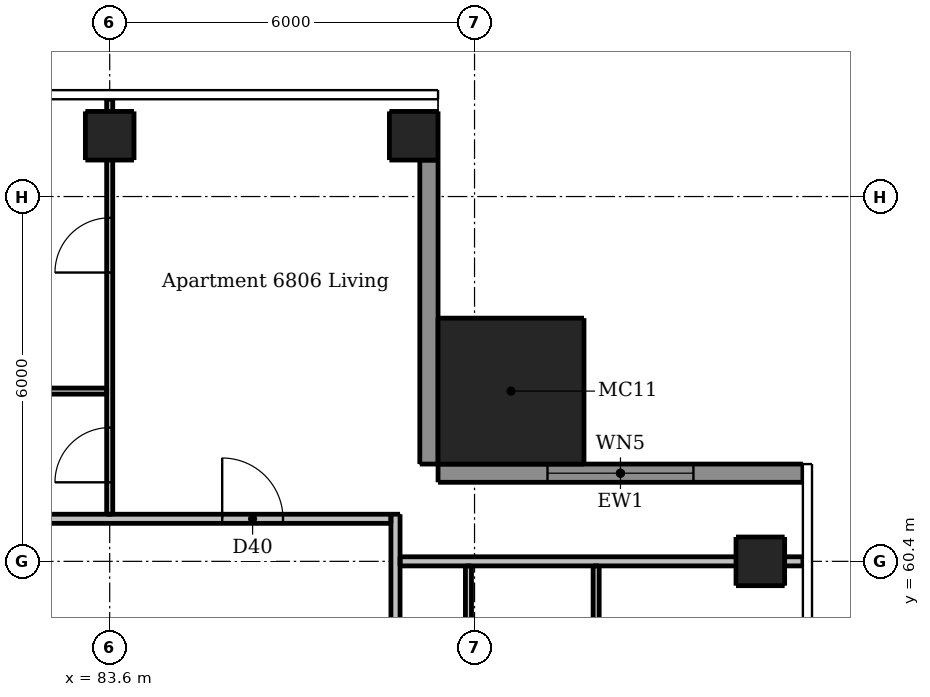
"""IFC4 building model, lengths in metres.
Left out: names, types, materials, properties, quantities, classifications, styles, units other than length and angle.
Written with IfcOpenShell. Run it as: python <this file> out.ifc"""

import sys

from ifc_helpers import new_model, si_unit, direction, frame, frame_2d, origin, origin_2d, place, context, subcontext, project, spatial, rectangle, extrude, element, fill, save


model = new_model("IFC4")
c1 = context("Model", 3, precision=1e-05, world=origin(), true_north=direction((0.0, 1.0)))
c2 = subcontext(c1, "Body", "Model", "MODEL_VIEW")
j1 = project(units=[si_unit("LENGTHUNIT", "METRE"), si_unit("PLANEANGLEUNIT", "RADIAN")], contexts=[c1])
p1 = place(None, origin())
s1 = spatial("IfcSite", under=j1, at=p1, CompositionType="ELEMENT")
p2 = place(p1, origin())
s2 = spatial("IfcBuilding", under=s1, at=p2, CompositionType="ELEMENT")
p3 = place(p2, frame((0.0, 0.0, 255.4)))
s3 = spatial("IfcBuildingStorey", under=s2, at=p3, CompositionType="ELEMENT", Elevation=255.4)
for number, where, z_axis, x_axis in (
    (1, (94.3, 60.4, 0.0), (0.0, 0.0, 1.0), (1.0, 0.0, 0.0)),
    (2, (83.6, 67.4, 0.0), (0.0, 0.0, 1.0), (1.0, 0.0, 0.0)),
    (3, (88.6, 67.4, 0.0), (0.0, 0.0, 1.0), (1.0, 0.0, 0.0)),
):
    element("IfcColumn", number, at=place(p3, frame(where, z_axis=z_axis, x_axis=x_axis)), inside=s3, PredefinedType="COLUMN", context=c2, shape_type="SweptSolid", body=[
        extrude(rectangle(XDim=0.8, YDim=0.8, at=origin_2d()), origin(), (0.0, 0.0, 1.0), 3.05),
    ])
p4 = place(p3, frame((90.2, 63.2, 0.0), z_axis=(0.0, 0.0, 1.0), x_axis=(1.0, 0.0, 0.0)))
e4 = element("IfcColumn", 4, at=p4, inside=s3, PredefinedType="COLUMN", context=c2, shape_type="SweptSolid", body=[
    extrude(rectangle(XDim=2.4, YDim=2.4, at=origin_2d()), origin(), (0.0, 0.0, 1.0), 3.3),
])
p5 = place(p3, frame((95.0, 61.85, 0.0), z_axis=(0.0, 0.0, 1.0), x_axis=(-1.0, 0.0, 0.0)))
e5 = element("IfcWall", 5, at=p5, inside=s3, PredefinedType="SOLIDWALL", context=c2, shape_type="SweptSolid", body=[
    extrude(rectangle(XDim=6.0, YDim=0.3, at=frame_2d((3.0, 0.0))), origin(), (0.0, 0.0, 1.0), 3.05),
])
p6 = place(p5, frame((1.8, 0.0, 0.15)))
e6 = element("IfcOpeningElement", 6, at=p6, cuts=e5, PredefinedType="OPENING", context=c2, shape_type="SweptSolid", body=[
    extrude(rectangle(XDim=2.4, YDim=2.1, at=frame_2d((1.2, 1.05))), frame((0.0, 0.16, 0.0), z_axis=(0.0, -1.0, 0.0), x_axis=(1.0, 0.0, 0.0)), (0.0, 0.0, 1.0), 0.32),
])
p7 = place(p3, frame((88.85, 62.0, 0.0), z_axis=(0.0, 0.0, 1.0), x_axis=(0.0, 1.0, 0.0)))
e7 = element("IfcWall", 7, at=p7, inside=s3, PredefinedType="SOLIDWALL", context=c2, shape_type="SweptSolid", body=[
    extrude(rectangle(XDim=5.0, YDim=0.3, at=frame_2d((2.5, 0.0))), origin(), (0.0, 0.0, 1.0), 3.05),
])
p8 = place(p3, frame((83.6, 61.175, 0.0), z_axis=(0.0, 0.0, 1.0), x_axis=(0.0, 1.0, 0.0)))
e8 = element("IfcWall", 8, at=p8, inside=s3, PredefinedType="PARTITIONING", context=c2, shape_type="SweptSolid", body=[
    extrude(rectangle(XDim=6.825, YDim=0.1, at=frame_2d((3.413, 0.0))), origin(), (0.0, 0.0, 1.0), 2.516),
])
p9 = place(p8, frame((0.525, 0.0, 0.0)))
e9 = element("IfcOpeningElement", 9, at=p9, cuts=e8, PredefinedType="OPENING", context=c2, shape_type="SweptSolid", body=[
    extrude(rectangle(XDim=0.9, YDim=2.1, at=frame_2d((0.45, 1.05))), frame((0.0, 0.06, 0.0), z_axis=(0.0, -1.0, 0.0), x_axis=(1.0, 0.0, 0.0)), (0.0, 0.0, 1.0), 0.12),
])
p10 = place(p8, frame((3.975, 0.0, 0.0)))
e10 = element("IfcOpeningElement", 10, at=p10, cuts=e8, PredefinedType="OPENING", context=c2, shape_type="SweptSolid", body=[
    extrude(rectangle(XDim=0.9, YDim=2.1, at=frame_2d((0.45, 1.05))), frame((0.0, 0.06, 0.0), z_axis=(0.0, -1.0, 0.0), x_axis=(1.0, 0.0, 0.0)), (0.0, 0.0, 1.0), 0.12),
])
p11 = place(p3, frame((89.5, 60.325, 0.0), z_axis=(0.0, 0.0, 1.0), x_axis=(0.0, -1.0, 0.0)))
e11 = element("IfcWall", 11, at=p11, inside=s3, PredefinedType="PARTITIONING", context=c2, shape_type="SweptSolid", body=[
    extrude(rectangle(XDim=17.85, YDim=0.1, at=frame_2d((8.925, 0.0))), origin(), (0.0, 0.0, 1.0), 3.05),
])
p12 = place(p11, frame((6.975, 0.0, 0.0)))
e12 = element("IfcOpeningElement", 12, at=p12, cuts=e11, PredefinedType="OPENING", context=c2, shape_type="SweptSolid", body=[
    extrude(rectangle(XDim=0.9, YDim=2.1, at=frame_2d((0.45, 1.05))), frame((0.0, 0.06, 0.0), z_axis=(0.0, -1.0, 0.0), x_axis=(1.0, 0.0, 0.0)), (0.0, 0.0, 1.0), 0.12),
])
p13 = place(p11, frame((0.975, 0.0, 0.0)))
e13 = element("IfcOpeningElement", 13, at=p13, cuts=e11, PredefinedType="OPENING", context=c2, shape_type="SweptSolid", body=[
    extrude(rectangle(XDim=0.9, YDim=2.1, at=frame_2d((0.45, 1.05))), frame((0.0, 0.06, 0.0), z_axis=(0.0, -1.0, 0.0), x_axis=(1.0, 0.0, 0.0)), (0.0, 0.0, 1.0), 0.12),
])
p14 = place(p11, frame((15.675, 0.0, 0.0)))
e14 = element("IfcOpeningElement", 14, at=p14, cuts=e11, PredefinedType="OPENING", context=c2, shape_type="SweptSolid", body=[
    extrude(rectangle(XDim=0.9, YDim=2.1, at=frame_2d((0.45, 1.05))), frame((0.0, 0.06, 0.0), z_axis=(0.0, -1.0, 0.0), x_axis=(1.0, 0.0, 0.0)), (0.0, 0.0, 1.0), 0.12),
])
p15 = place(p11, frame((12.725, 0.0, 0.0)))
e15 = element("IfcOpeningElement", 15, at=p15, cuts=e11, PredefinedType="OPENING", context=c2, shape_type="SweptSolid", body=[
    extrude(rectangle(XDim=0.8, YDim=2.1, at=frame_2d((0.4, 1.05))), frame((0.0, 0.06, 0.0), z_axis=(0.0, -1.0, 0.0), x_axis=(1.0, 0.0, 0.0)), (0.0, 0.0, 1.0), 0.12),
])
p16 = place(p3, frame((91.6, 57.35, 0.0), z_axis=(0.0, 0.0, 1.0), x_axis=(0.0, 1.0, 0.0)))
e16 = element("IfcWall", 16, at=p16, inside=s3, PredefinedType="PARTITIONING", context=c2, shape_type="SweptSolid", body=[
    extrude(rectangle(XDim=2.975, YDim=0.1, at=frame_2d((1.487, 0.0))), origin(), (0.0, 0.0, 1.0), 3.05),
])
p17 = place(p3, frame((83.55, 63.2, 0.0), z_axis=(0.0, 0.0, 1.0), x_axis=(-1.0, 0.0, 0.0)))
e17 = element("IfcWall", 17, at=p17, inside=s3, PredefinedType="PARTITIONING", context=c2, shape_type="SweptSolid", body=[
    extrude(rectangle(XDim=5.875, YDim=0.1, at=frame_2d((2.938, 0.0))), origin(), (0.0, 0.0, 1.0), 3.05),
])
p18 = place(p17, frame((3.75, 0.0, 0.0)))
e18 = element("IfcOpeningElement", 18, at=p18, cuts=e17, PredefinedType="OPENING", context=c2, shape_type="SweptSolid", body=[
    extrude(rectangle(XDim=0.8, YDim=2.1, at=frame_2d((0.4, 1.05))), frame((0.0, 0.06, 0.0), z_axis=(0.0, -1.0, 0.0), x_axis=(1.0, 0.0, 0.0)), (0.0, 0.0, 1.0), 0.12),
])
p19 = place(p3, frame((88.3, 61.175, 0.0), z_axis=(0.0, 0.0, 1.0), x_axis=(0.0, -1.0, 0.0)))
e19 = element("IfcWall", 19, at=p19, inside=s3, PredefinedType="PARTITIONING", context=c2, shape_type="SweptSolid", body=[
    extrude(rectangle(XDim=29.4, YDim=0.15, at=frame_2d((14.7, 0.0))), origin(), (0.0, 0.0, 1.0), 3.05),
])
p20 = place(p19, frame((27.025, 0.0, 0.0)))
e20 = element("IfcOpeningElement", 20, at=p20, cuts=e19, PredefinedType="OPENING", context=c2, shape_type="SweptSolid", body=[
    extrude(rectangle(XDim=1.0, YDim=2.1, at=frame_2d((0.5, 1.05))), frame((0.0, 0.085, 0.0), z_axis=(0.0, -1.0, 0.0), x_axis=(1.0, 0.0, 0.0)), (0.0, 0.0, 1.0), 0.17),
])
p21 = place(p19, frame((9.275, 0.0, 0.0)))
e21 = element("IfcOpeningElement", 21, at=p21, cuts=e19, PredefinedType="OPENING", context=c2, shape_type="SweptSolid", body=[
    extrude(rectangle(XDim=1.0, YDim=2.1, at=frame_2d((0.5, 1.05))), frame((0.0, 0.085, 0.0), z_axis=(0.0, -1.0, 0.0), x_axis=(1.0, 0.0, 0.0)), (0.0, 0.0, 1.0), 0.17),
])
p22 = place(p3, frame((58.975, 61.1, 0.0), z_axis=(0.0, 0.0, 1.0), x_axis=(1.0, 0.0, 0.0)))
e22 = element("IfcWall", 22, at=p22, inside=s3, PredefinedType="PARTITIONING", context=c2, shape_type="SweptSolid", body=[
    extrude(rectangle(XDim=29.25, YDim=0.15, at=frame_2d((14.625, 0.0))), origin(), (0.0, 0.0, 1.0), 3.05),
])
p23 = place(p22, frame((9.125, 0.0, 0.0)))
e23 = element("IfcOpeningElement", 23, at=p23, cuts=e22, PredefinedType="OPENING", context=c2, shape_type="SweptSolid", body=[
    extrude(rectangle(XDim=1.0, YDim=2.1, at=frame_2d((0.5, 1.05))), frame((0.0, 0.085, 0.0), z_axis=(0.0, -1.0, 0.0), x_axis=(1.0, 0.0, 0.0)), (0.0, 0.0, 1.0), 0.17),
])
p24 = place(p22, frame((26.475, 0.0, 0.0)))
e24 = element("IfcOpeningElement", 24, at=p24, cuts=e22, PredefinedType="OPENING", context=c2, shape_type="SweptSolid", body=[
    extrude(rectangle(XDim=1.0, YDim=2.1, at=frame_2d((0.5, 1.05))), frame((0.0, 0.085, 0.0), z_axis=(0.0, -1.0, 0.0), x_axis=(1.0, 0.0, 0.0)), (0.0, 0.0, 1.0), 0.17),
])
p25 = place(p3, frame((88.375, 60.4, 0.0), z_axis=(0.0, 0.0, 1.0), x_axis=(1.0, 0.0, 0.0)))
e25 = element("IfcWall", 25, at=p25, inside=s3, PredefinedType="PARTITIONING", context=c2, shape_type="SweptSolid", body=[
    extrude(rectangle(XDim=6.625, YDim=0.15, at=frame_2d((3.312, 0.0))), origin(), (0.0, 0.0, 1.0), 2.647),
])
p26 = place(p6, origin())
e26 = element("IfcWindow", 26, at=p26, inside=s3, PartitioningType="DOUBLE_PANEL_VERTICAL", PredefinedType="WINDOW", context=c2, shape_type="SweptSolid", body=[
    extrude(rectangle(XDim=2.4, YDim=2.1, at=frame_2d((1.2, 1.05))), frame((0.0, 0.03, 0.0), z_axis=(0.0, -1.0, 0.0), x_axis=(1.0, 0.0, 0.0)), (0.0, 0.0, 1.0), 0.06),
])
fill(e6, e26)
p27 = place(p24, origin())
e27 = element("IfcDoor", 27, at=p27, inside=s3, OperationType="SINGLE_SWING_LEFT", PredefinedType="DOOR", context=c2, shape_type="SweptSolid", body=[
    extrude(rectangle(XDim=1.0, YDim=2.1, at=frame_2d((0.5, 1.05))), frame((0.0, 0.025, 0.0), z_axis=(0.0, -1.0, 0.0), x_axis=(1.0, 0.0, 0.0)), (0.0, 0.0, 1.0), 0.05),
])
fill(e24, e27)
p28 = place(p9, origin())
e28 = element("IfcDoor", 28, at=p28, inside=s3, OperationType="SINGLE_SWING_LEFT", PredefinedType="DOOR", context=c2, shape_type="SweptSolid", body=[
    extrude(rectangle(XDim=0.9, YDim=2.1, at=frame_2d((0.45, 1.05))), frame((0.0, 0.025, 0.0), z_axis=(0.0, -1.0, 0.0), x_axis=(1.0, 0.0, 0.0)), (0.0, 0.0, 1.0), 0.05),
])
fill(e9, e28)
p29 = place(p10, origin())
e29 = element("IfcDoor", 29, at=p29, inside=s3, OperationType="SINGLE_SWING_LEFT", PredefinedType="DOOR", context=c2, shape_type="SweptSolid", body=[
    extrude(rectangle(XDim=0.9, YDim=2.1, at=frame_2d((0.45, 1.05))), frame((0.0, 0.025, 0.0), z_axis=(0.0, -1.0, 0.0), x_axis=(1.0, 0.0, 0.0)), (0.0, 0.0, 1.0), 0.05),
])
fill(e10, e29)
save(model, sys.argv[1])
